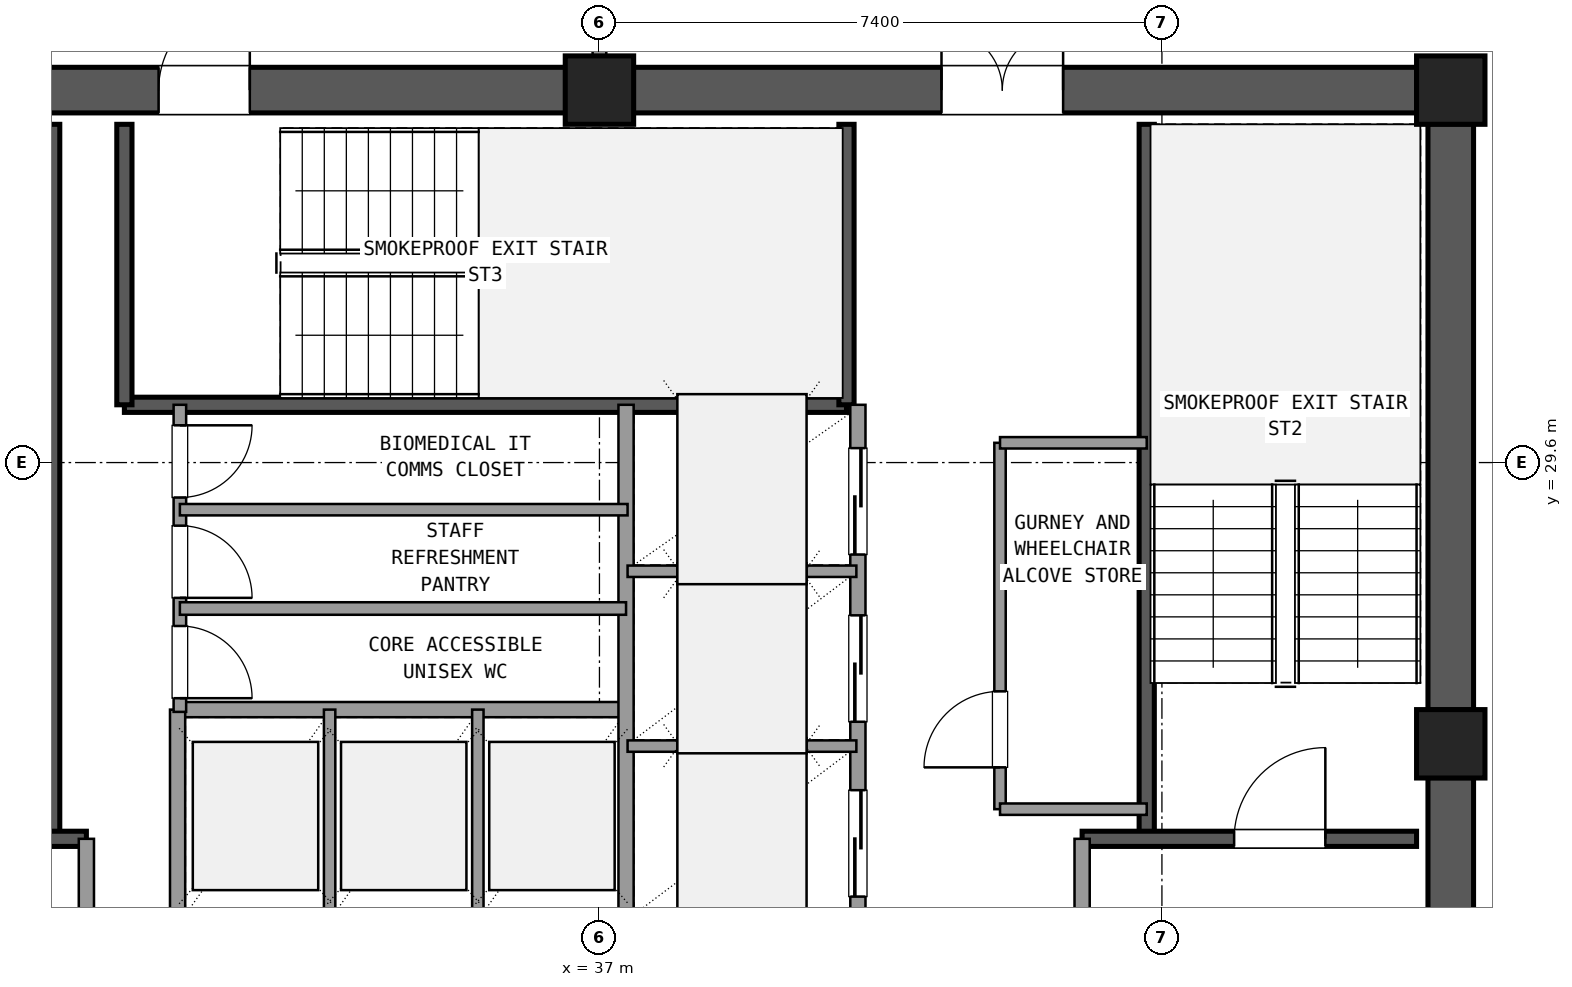
"""IFC4 building model, lengths in metres.
Left out: names, types, materials, properties, quantities, classifications, styles, units other than length and angle.
Written with IfcOpenShell. Run it as: python <this file> out.ifc"""

import sys

from ifc_helpers import new_model, si_unit, direction, frame, frame_2d, origin, origin_2d, place, context, subcontext, project, spatial, rectangle, extrude, element, fill, save


model = new_model("IFC4")
c1 = context("Model", 3, precision=1e-05, world=origin(), true_north=direction((0.0, 1.0)))
c2 = subcontext(c1, "Body", "Model", "MODEL_VIEW")
j1 = project(units=[si_unit("LENGTHUNIT", "METRE"), si_unit("PLANEANGLEUNIT", "RADIAN")], contexts=[c1])
p1 = place(None, origin())
s1 = spatial("IfcSite", under=j1, at=p1, CompositionType="ELEMENT")
p2 = place(p1, origin())
s2 = spatial("IfcBuilding", under=s1, at=p2, CompositionType="ELEMENT")
p3 = place(p2, frame((0.0, 0.0, 207.18)))
s3 = spatial("IfcBuildingStorey", under=s2, at=p3, CompositionType="ELEMENT", Elevation=207.18)
for number, where, z_axis, x_axis in (
    (1, (48.2, 25.9, 0.0), (0.0, 0.0, 1.0), (1.0, 0.0, 0.0)),
    (2, (48.2, 34.5, 0.0), (0.0, 0.0, 1.0), (1.0, 0.0, 0.0)),
    (3, (37.0, 34.5, 0.0), (0.0, 0.0, 1.0), (1.0, 0.0, 0.0)),
):
    element("IfcColumn", number, at=place(p3, frame(where, z_axis=z_axis, x_axis=x_axis)), inside=s3, PredefinedType="COLUMN", context=c2, shape_type="SweptSolid", body=[
        extrude(rectangle(XDim=0.9, YDim=0.9, at=origin_2d()), origin(), (0.0, 0.0, 1.0), 3.6),
    ])
p4 = place(p3, frame((48.2, 17.745, 0.0), z_axis=(0.0, 0.0, 1.0), x_axis=(0.0, 1.0, 0.0)))
e4 = element("IfcWall", 4, at=p4, inside=s3, PredefinedType="SHEAR", context=c2, shape_type="SweptSolid", body=[
    extrude(rectangle(XDim=7.71, YDim=0.6, at=frame_2d((3.855, 0.0))), origin(), (0.0, 0.0, 1.0), 3.32),
])
p5 = place(p4, frame((4.305, 0.0, 0.0)))
e5 = element("IfcOpeningElement", 5, at=p5, cuts=e4, PredefinedType="OPENING", context=c2, shape_type="SweptSolid", body=[
    extrude(rectangle(XDim=1.2, YDim=2.15, at=frame_2d((0.6, 1.075))), frame((0.0, 0.31, 0.0), z_axis=(0.0, -1.0, 0.0), x_axis=(1.0, 0.0, 0.0)), (0.0, 0.0, 1.0), 0.62),
])
p6 = place(p3, frame((48.2, 26.345, 0.0), z_axis=(0.0, 0.0, 1.0), x_axis=(0.0, 1.0, 0.0)))
e6 = element("IfcWall", 6, at=p6, inside=s3, PredefinedType="SHEAR", context=c2, shape_type="SweptSolid", body=[
    extrude(rectangle(XDim=7.71, YDim=0.6, at=frame_2d((3.855, 0.0))), origin(), (0.0, 0.0, 1.0), 3.32),
])
p7 = place(p3, frame((47.755, 34.5, 0.0), z_axis=(0.0, 0.0, 1.0), x_axis=(-1.0, 0.0, 0.0)))
e7 = element("IfcWall", 7, at=p7, inside=s3, PredefinedType="SHEAR", context=c2, shape_type="SweptSolid", body=[
    extrude(rectangle(XDim=10.31, YDim=0.6, at=frame_2d((5.155, 0.0))), origin(), (0.0, 0.0, 1.0), 3.32),
])
p8 = place(p7, frame((4.655, 0.0, 0.0)))
e8 = element("IfcOpeningElement", 8, at=p8, cuts=e7, PredefinedType="OPENING", context=c2, shape_type="SweptSolid", body=[
    extrude(rectangle(XDim=1.6, YDim=2.2, at=frame_2d((0.8, 1.1))), frame((0.0, 0.31, 0.0), z_axis=(0.0, -1.0, 0.0), x_axis=(1.0, 0.0, 0.0)), (0.0, 0.0, 1.0), 0.62),
])
p9 = place(p3, frame((36.555, 34.5, 0.0), z_axis=(0.0, 0.0, 1.0), x_axis=(-1.0, 0.0, 0.0)))
e9 = element("IfcWall", 9, at=p9, inside=s3, PredefinedType="SHEAR", context=c2, shape_type="SweptSolid", body=[
    extrude(rectangle(XDim=10.31, YDim=0.6, at=frame_2d((5.155, 0.0))), origin(), (0.0, 0.0, 1.0), 3.32),
])
p10 = place(p9, frame((4.155, 0.0, 0.0)))
e10 = element("IfcOpeningElement", 10, at=p10, cuts=e9, PredefinedType="OPENING", context=c2, shape_type="SweptSolid", body=[
    extrude(rectangle(XDim=1.2, YDim=2.15, at=frame_2d((0.6, 1.075))), frame((0.0, 0.31, 0.0), z_axis=(0.0, -1.0, 0.0), x_axis=(1.0, 0.0, 0.0)), (0.0, 0.0, 1.0), 0.62),
])
p11 = place(p3, frame((29.8, 24.65, 0.0), z_axis=(0.0, 0.0, 1.0), x_axis=(0.0, 1.0, 0.0)))
e11 = element("IfcWall", 11, at=p11, inside=s3, PredefinedType="SHEAR", context=c2, shape_type="SweptSolid", body=[
    extrude(rectangle(XDim=9.4, YDim=0.2, at=frame_2d((4.7, 0.0))), origin(), (0.0, 0.0, 1.0), 3.32),
])
p12 = place(p3, frame((26.25, 24.65, 0.0), z_axis=(0.0, 0.0, 1.0), x_axis=(1.0, 0.0, 0.0)))
e12 = element("IfcWall", 12, at=p12, inside=s3, PredefinedType="SHEAR", context=c2, shape_type="SweptSolid", body=[
    extrude(rectangle(XDim=4.0, YDim=0.2, at=frame_2d((2.0, 0.0))), origin(), (0.0, 0.0, 1.0), 3.32),
])
p13 = place(p12, frame((1.0, 0.0, 0.0)))
e13 = element("IfcOpeningElement", 13, at=p13, cuts=e12, PredefinedType="OPENING", context=c2, shape_type="SweptSolid", body=[
    extrude(rectangle(XDim=1.2, YDim=2.15, at=frame_2d((0.6, 1.075))), frame((0.0, 0.11, 0.0), z_axis=(0.0, -1.0, 0.0), x_axis=(1.0, 0.0, 0.0)), (0.0, 0.0, 1.0), 0.22),
])
p14 = place(p3, frame((44.2, 24.65, 0.0), z_axis=(0.0, 0.0, 1.0), x_axis=(0.0, 1.0, 0.0)))
e14 = element("IfcWall", 14, at=p14, inside=s3, PredefinedType="SHEAR", context=c2, shape_type="SweptSolid", body=[
    extrude(rectangle(XDim=9.4, YDim=0.2, at=frame_2d((4.7, 0.0))), origin(), (0.0, 0.0, 1.0), 3.32),
])
p15 = place(p3, frame((43.35, 24.65, 0.0), z_axis=(0.0, 0.0, 1.0), x_axis=(1.0, 0.0, 0.0)))
e15 = element("IfcWall", 15, at=p15, inside=s3, PredefinedType="SHEAR", context=c2, shape_type="SweptSolid", body=[
    extrude(rectangle(XDim=4.4, YDim=0.2, at=frame_2d((2.2, 0.0))), origin(), (0.0, 0.0, 1.0), 3.32),
])
p16 = place(p15, frame((2.0, 0.0, 0.0)))
e16 = element("IfcOpeningElement", 16, at=p16, cuts=e15, PredefinedType="OPENING", context=c2, shape_type="SweptSolid", body=[
    extrude(rectangle(XDim=1.2, YDim=2.15, at=frame_2d((0.6, 1.075))), frame((0.0, 0.11, 0.0), z_axis=(0.0, -1.0, 0.0), x_axis=(1.0, 0.0, 0.0)), (0.0, 0.0, 1.0), 0.22),
])
p17 = place(p3, frame((30.75, 30.36, 0.0), z_axis=(0.0, 0.0, 1.0), x_axis=(1.0, 0.0, 0.0)))
e17 = element("IfcWall", 17, at=p17, inside=s3, PredefinedType="SHEAR", context=c2, shape_type="SweptSolid", body=[
    extrude(rectangle(XDim=9.5, YDim=0.2, at=frame_2d((4.75, 0.0))), origin(), (0.0, 0.0, 1.0), 3.32),
])
for number, where, z_axis, x_axis in (
    (18, (30.75, 30.36, 0.0), (0.0, 0.0, 1.0), (0.0, 1.0, 0.0)),
    (19, (40.25, 30.36, 0.0), (0.0, 0.0, 1.0), (0.0, 1.0, 0.0)),
):
    element("IfcWall", number, at=place(p3, frame(where, z_axis=z_axis, x_axis=x_axis)), inside=s3, PredefinedType="SHEAR", context=c2, shape_type="SweptSolid", body=[
        extrude(rectangle(XDim=3.69, YDim=0.2, at=frame_2d((1.845, 0.0))), origin(), (0.0, 0.0, 1.0), 3.32),
    ])
p18 = place(p3, frame((30.25, 17.75, 0.0), z_axis=(0.0, 0.0, 1.0), x_axis=(0.0, 1.0, 0.0)))
e20 = element("IfcWall", 20, at=p18, inside=s3, PredefinedType="SOLIDWALL", context=c2, shape_type="SweptSolid", body=[
    extrude(rectangle(XDim=6.9, YDim=0.2, at=frame_2d((3.45, 0.0))), origin(), (0.0, 0.0, 1.0), 2.61),
])
p19 = place(p18, frame((4.15, 0.0, 0.0)))
e21 = element("IfcOpeningElement", 21, at=p19, cuts=e20, PredefinedType="OPENING", context=c2, shape_type="SweptSolid", body=[
    extrude(rectangle(XDim=1.2, YDim=2.15, at=frame_2d((0.6, 1.075))), frame((0.0, 0.11, 0.0), z_axis=(0.0, -1.0, 0.0), x_axis=(1.0, 0.0, 0.0)), (0.0, 0.0, 1.0), 0.22),
])
p20 = place(p3, frame((43.35, 17.75, 0.0), z_axis=(0.0, 0.0, 1.0), x_axis=(0.0, 1.0, 0.0)))
e22 = element("IfcWall", 22, at=p20, inside=s3, PredefinedType="SOLIDWALL", context=c2, shape_type="SweptSolid", body=[
    extrude(rectangle(XDim=6.9, YDim=0.2, at=frame_2d((3.45, 0.0))), origin(), (0.0, 0.0, 1.0), 2.61),
])
p21 = place(p20, frame((4.15, 0.0, 0.0)))
e23 = element("IfcOpeningElement", 23, at=p21, cuts=e22, PredefinedType="OPENING", context=c2, shape_type="SweptSolid", body=[
    extrude(rectangle(XDim=1.2, YDim=2.15, at=frame_2d((0.6, 1.075))), frame((0.0, 0.11, 0.0), z_axis=(0.0, -1.0, 0.0), x_axis=(1.0, 0.0, 0.0)), (0.0, 0.0, 1.0), 0.22),
])
p22 = place(p3, frame((31.45, 26.35, 0.0), z_axis=(0.0, 0.0, 1.0), x_axis=(1.0, 0.0, 0.0)))
e24 = element("IfcWall", 24, at=p22, inside=s3, PredefinedType="SOLIDWALL", context=c2, shape_type="SweptSolid", body=[
    extrude(rectangle(XDim=5.9, YDim=0.2, at=frame_2d((2.95, 0.0))), origin(), (0.0, 0.0, 1.0), 2.61),
])
p23 = place(p3, frame((31.45, 23.54, 0.0), z_axis=(0.0, 0.0, 1.0), x_axis=(0.0, 1.0, 0.0)))
e25 = element("IfcWall", 25, at=p23, inside=s3, PredefinedType="SOLIDWALL", context=c2, shape_type="SweptSolid", body=[
    extrude(rectangle(XDim=2.81, YDim=0.2, at=frame_2d((1.405, 0.0))), origin(), (0.0, 0.0, 1.0), 2.61),
])
for number, where, z_axis, x_axis in (
    (26, (33.45, 23.54, 0.0), (0.0, 0.0, 1.0), (0.0, 1.0, 0.0)),
    (27, (35.4, 23.54, 0.0), (0.0, 0.0, 1.0), (0.0, 1.0, 0.0)),
):
    element("IfcWall", number, at=place(p3, frame(where, z_axis=z_axis, x_axis=x_axis)), inside=s3, PredefinedType="PARTITIONING", context=c2, shape_type="SweptSolid", body=[
        extrude(rectangle(XDim=2.81, YDim=0.15, at=frame_2d((1.405, 0.0))), origin(), (0.0, 0.0, 1.0), 2.61),
    ])
p24 = place(p3, frame((37.35, 23.54, 0.0), z_axis=(0.0, 0.0, 1.0), x_axis=(0.0, 1.0, 0.0)))
e28 = element("IfcWall", 28, at=p24, inside=s3, PredefinedType="SOLIDWALL", context=c2, shape_type="SweptSolid", body=[
    extrude(rectangle(XDim=6.82, YDim=0.2, at=frame_2d((3.41, 0.0))), origin(), (0.0, 0.0, 1.0), 2.61),
])
p25 = place(p3, frame((40.4, 23.54, 0.0), z_axis=(0.0, 0.0, 1.0), x_axis=(0.0, 1.0, 0.0)))
e29 = element("IfcWall", 29, at=p25, inside=s3, PredefinedType="SOLIDWALL", context=c2, shape_type="SweptSolid", body=[
    extrude(rectangle(XDim=6.82, YDim=0.2, at=frame_2d((3.41, 0.0))), origin(), (0.0, 0.0, 1.0), 2.61),
])
p26 = place(p25, frame((0.35, 0.0, 0.0)))
e30 = element("IfcOpeningElement", 30, at=p26, cuts=e29, PredefinedType="OPENING", context=c2, shape_type="SweptSolid", body=[
    extrude(rectangle(XDim=1.4, YDim=2.2, at=frame_2d((0.7, 1.1))), frame((0.0, 0.11, 0.0), z_axis=(0.0, -1.0, 0.0), x_axis=(1.0, 0.0, 0.0)), (0.0, 0.0, 1.0), 0.22),
])
p27 = place(p25, frame((2.65, 0.0, 0.0)))
e31 = element("IfcOpeningElement", 31, at=p27, cuts=e29, PredefinedType="OPENING", context=c2, shape_type="SweptSolid", body=[
    extrude(rectangle(XDim=1.4, YDim=2.2, at=frame_2d((0.7, 1.1))), frame((0.0, 0.11, 0.0), z_axis=(0.0, -1.0, 0.0), x_axis=(1.0, 0.0, 0.0)), (0.0, 0.0, 1.0), 0.22),
])
p28 = place(p25, frame((4.85, 0.0, 0.0)))
e32 = element("IfcOpeningElement", 32, at=p28, cuts=e29, PredefinedType="OPENING", context=c2, shape_type="SweptSolid", body=[
    extrude(rectangle(XDim=1.4, YDim=2.2, at=frame_2d((0.7, 1.1))), frame((0.0, 0.11, 0.0), z_axis=(0.0, -1.0, 0.0), x_axis=(1.0, 0.0, 0.0)), (0.0, 0.0, 1.0), 0.22),
])
for number, where, z_axis, x_axis in (
    (33, (37.37, 25.87, 0.0), (0.0, 0.0, 1.0), (1.0, 0.0, 0.0)),
    (34, (37.37, 28.17, 0.0), (0.0, 0.0, 1.0), (1.0, 0.0, 0.0)),
):
    element("IfcWall", number, at=place(p3, frame(where, z_axis=z_axis, x_axis=x_axis)), inside=s3, PredefinedType="PARTITIONING", context=c2, shape_type="SweptSolid", body=[
        extrude(rectangle(XDim=3.01, YDim=0.15, at=frame_2d((1.505, 0.0))), origin(), (0.0, 0.0, 1.0), 2.61),
    ])
p29 = place(p3, frame((42.27, 25.04, 0.0), z_axis=(0.0, 0.0, 1.0), x_axis=(0.0, 1.0, 0.0)))
e35 = element("IfcWall", 35, at=p29, inside=s3, PredefinedType="PARTITIONING", context=c2, shape_type="SweptSolid", body=[
    extrude(rectangle(XDim=4.82, YDim=0.15, at=frame_2d((2.41, 0.0))), origin(), (0.0, 0.0, 1.0), 2.61),
])
p30 = place(p29, frame((0.55, 0.0, 0.0)))
e36 = element("IfcOpeningElement", 36, at=p30, cuts=e35, PredefinedType="OPENING", context=c2, shape_type="SweptSolid", body=[
    extrude(rectangle(XDim=1.0, YDim=2.15, at=frame_2d((0.5, 1.075))), frame((0.0, 0.085, 0.0), z_axis=(0.0, -1.0, 0.0), x_axis=(1.0, 0.0, 0.0)), (0.0, 0.0, 1.0), 0.17),
])
for number, where, z_axis, x_axis in (
    (37, (42.27, 25.04, 0.0), (0.0, 0.0, 1.0), (1.0, 0.0, 0.0)),
    (38, (42.27, 29.86, 0.0), (0.0, 0.0, 1.0), (1.0, 0.0, 0.0)),
):
    element("IfcWall", number, at=place(p3, frame(where, z_axis=z_axis, x_axis=x_axis)), inside=s3, PredefinedType="PARTITIONING", context=c2, shape_type="SweptSolid", body=[
        extrude(rectangle(XDim=1.93, YDim=0.15, at=frame_2d((0.965, 0.0))), origin(), (0.0, 0.0, 1.0), 2.61),
    ])
p31 = place(p3, frame((31.48, 26.32, 0.0), z_axis=(0.0, 0.0, 1.0), x_axis=(0.0, 1.0, 0.0)))
e39 = element("IfcWall", 39, at=p31, inside=s3, PredefinedType="PLUMBINGWALL", context=c2, shape_type="SweptSolid", body=[
    extrude(rectangle(XDim=4.04, YDim=0.165, at=frame_2d((2.02, 0.0))), origin(), (0.0, 0.0, 1.0), 2.61),
])
p32 = place(p31, frame((0.18, 0.0, 0.0)))
e40 = element("IfcOpeningElement", 40, at=p32, cuts=e39, PredefinedType="OPENING", context=c2, shape_type="SweptSolid", body=[
    extrude(rectangle(XDim=0.95, YDim=2.1, at=frame_2d((0.475, 1.05))), frame((0.0, 0.093, 0.0), z_axis=(0.0, -1.0, 0.0), x_axis=(1.0, 0.0, 0.0)), (0.0, 0.0, 1.0), 0.185),
])
p33 = place(p31, frame((1.5, 0.0, 0.0)))
e41 = element("IfcOpeningElement", 41, at=p33, cuts=e39, PredefinedType="OPENING", context=c2, shape_type="SweptSolid", body=[
    extrude(rectangle(XDim=0.95, YDim=2.1, at=frame_2d((0.475, 1.05))), frame((0.0, 0.093, 0.0), z_axis=(0.0, -1.0, 0.0), x_axis=(1.0, 0.0, 0.0)), (0.0, 0.0, 1.0), 0.185),
])
p34 = place(p31, frame((2.82, 0.0, 0.0)))
e42 = element("IfcOpeningElement", 42, at=p34, cuts=e39, PredefinedType="OPENING", context=c2, shape_type="SweptSolid", body=[
    extrude(rectangle(XDim=0.95, YDim=2.1, at=frame_2d((0.475, 1.05))), frame((0.0, 0.093, 0.0), z_axis=(0.0, -1.0, 0.0), x_axis=(1.0, 0.0, 0.0)), (0.0, 0.0, 1.0), 0.185),
])
p35 = place(p3, frame((31.48, 27.68, 0.0), z_axis=(0.0, 0.0, 1.0), x_axis=(1.0, 0.0, 0.0)))
e43 = element("IfcWall", 43, at=p35, inside=s3, PredefinedType="PLUMBINGWALL", context=c2, shape_type="SweptSolid", body=[
    extrude(rectangle(XDim=5.87, YDim=0.165, at=frame_2d((2.935, 0.0))), origin(), (0.0, 0.0, 1.0), 2.61),
])
p36 = place(p3, frame((31.48, 28.98, 0.0), z_axis=(0.0, 0.0, 1.0), x_axis=(1.0, 0.0, 0.0)))
e44 = element("IfcWall", 44, at=p36, inside=s3, PredefinedType="PARTITIONING", context=c2, shape_type="SweptSolid", body=[
    extrude(rectangle(XDim=5.89, YDim=0.15, at=frame_2d((2.945, 0.0))), origin(), (0.0, 0.0, 1.0), 2.61),
])
p37 = place(p3, frame((37.0, 34.95, 0.0), z_axis=(0.0, 0.0, 1.0), x_axis=(0.0, 1.0, 0.0)))
e45 = element("IfcWall", 45, at=p37, inside=s3, PredefinedType="PARTITIONING", context=c2, shape_type="SweptSolid", body=[
    extrude(rectangle(XDim=2.7, YDim=0.18, at=frame_2d((1.35, 0.0))), origin(), (0.0, 0.0, 1.0), 2.61),
])
p38 = place(p37, frame((0.35, 0.0, 0.0)))
e46 = element("IfcOpeningElement", 46, at=p38, cuts=e45, PredefinedType="OPENING", context=c2, shape_type="SweptSolid", body=[
    extrude(rectangle(XDim=2.0, YDim=2.2, at=frame_2d((1.0, 1.1))), frame((0.0, 0.1, 0.0), z_axis=(0.0, -1.0, 0.0), x_axis=(1.0, 0.0, 0.0)), (0.0, 0.0, 1.0), 0.2),
])
p39 = place(p16, origin())
e47 = element("IfcDoor", 47, at=p39, inside=s3, OperationType="SINGLE_SWING_RIGHT", PredefinedType="DOOR", context=c2, shape_type="SweptSolid", body=[
    extrude(rectangle(XDim=1.2, YDim=2.15, at=frame_2d((0.6, 1.075))), frame((0.0, 0.025, 0.0), z_axis=(0.0, -1.0, 0.0), x_axis=(1.0, 0.0, 0.0)), (0.0, 0.0, 1.0), 0.05),
])
fill(e16, e47)
p40 = place(p8, frame((1.6, 0.0, 0.0), z_axis=(0.0, 0.0, 1.0), x_axis=(-1.0, 0.0, 0.0)))
e48 = element("IfcDoor", 48, at=p40, inside=s3, OperationType="DOUBLE_DOOR_SINGLE_SWING", PredefinedType="DOOR", context=c2, shape_type="SweptSolid", body=[
    extrude(rectangle(XDim=1.6, YDim=2.2, at=frame_2d((0.8, 1.1))), frame((0.0, 0.025, 0.0), z_axis=(0.0, -1.0, 0.0), x_axis=(1.0, 0.0, 0.0)), (0.0, 0.0, 1.0), 0.05),
])
fill(e8, e48)
p41 = place(p10, frame((1.2, 0.0, 0.0), z_axis=(0.0, 0.0, 1.0), x_axis=(-1.0, 0.0, 0.0)))
e49 = element("IfcDoor", 49, at=p41, inside=s3, OperationType="SINGLE_SWING_LEFT", PredefinedType="DOOR", context=c2, shape_type="SweptSolid", body=[
    extrude(rectangle(XDim=1.2, YDim=2.15, at=frame_2d((0.6, 1.075))), frame((0.0, 0.025, 0.0), z_axis=(0.0, -1.0, 0.0), x_axis=(1.0, 0.0, 0.0)), (0.0, 0.0, 1.0), 0.05),
])
fill(e10, e49)
p42 = place(p26, origin())
e50 = element("IfcDoor", 50, at=p42, inside=s3, OperationType="SLIDING_TO_LEFT", PredefinedType="DOOR", context=c2, shape_type="SweptSolid", body=[
    extrude(rectangle(XDim=1.4, YDim=2.2, at=frame_2d((0.7, 1.1))), frame((0.0, 0.025, 0.0), z_axis=(0.0, -1.0, 0.0), x_axis=(1.0, 0.0, 0.0)), (0.0, 0.0, 1.0), 0.05),
])
fill(e30, e50)
p43 = place(p27, origin())
e51 = element("IfcDoor", 51, at=p43, inside=s3, OperationType="SLIDING_TO_LEFT", PredefinedType="DOOR", context=c2, shape_type="SweptSolid", body=[
    extrude(rectangle(XDim=1.4, YDim=2.2, at=frame_2d((0.7, 1.1))), frame((0.0, 0.025, 0.0), z_axis=(0.0, -1.0, 0.0), x_axis=(1.0, 0.0, 0.0)), (0.0, 0.0, 1.0), 0.05),
])
fill(e31, e51)
p44 = place(p28, origin())
e52 = element("IfcDoor", 52, at=p44, inside=s3, OperationType="SLIDING_TO_RIGHT", PredefinedType="DOOR", context=c2, shape_type="SweptSolid", body=[
    extrude(rectangle(XDim=1.4, YDim=2.2, at=frame_2d((0.7, 1.1))), frame((0.0, 0.025, 0.0), z_axis=(0.0, -1.0, 0.0), x_axis=(1.0, 0.0, 0.0)), (0.0, 0.0, 1.0), 0.05),
])
fill(e32, e52)
p45 = place(p30, origin())
e53 = element("IfcDoor", 53, at=p45, inside=s3, OperationType="SINGLE_SWING_LEFT", PredefinedType="DOOR", context=c2, shape_type="SweptSolid", body=[
    extrude(rectangle(XDim=1.0, YDim=2.15, at=frame_2d((0.5, 1.075))), frame((0.0, 0.025, 0.0), z_axis=(0.0, -1.0, 0.0), x_axis=(1.0, 0.0, 0.0)), (0.0, 0.0, 1.0), 0.05),
])
fill(e36, e53)
p46 = place(p32, frame((0.95, 0.0, 0.0), z_axis=(0.0, 0.0, 1.0), x_axis=(-1.0, 0.0, 0.0)))
e54 = element("IfcDoor", 54, at=p46, inside=s3, OperationType="SINGLE_SWING_LEFT", PredefinedType="DOOR", context=c2, shape_type="SweptSolid", body=[
    extrude(rectangle(XDim=0.95, YDim=2.1, at=frame_2d((0.475, 1.05))), frame((0.0, 0.025, 0.0), z_axis=(0.0, -1.0, 0.0), x_axis=(1.0, 0.0, 0.0)), (0.0, 0.0, 1.0), 0.05),
])
fill(e40, e54)
p47 = place(p33, frame((0.95, 0.0, 0.0), z_axis=(0.0, 0.0, 1.0), x_axis=(-1.0, 0.0, 0.0)))
e55 = element("IfcDoor", 55, at=p47, inside=s3, OperationType="SINGLE_SWING_LEFT", PredefinedType="DOOR", context=c2, shape_type="SweptSolid", body=[
    extrude(rectangle(XDim=0.95, YDim=2.1, at=frame_2d((0.475, 1.05))), frame((0.0, 0.025, 0.0), z_axis=(0.0, -1.0, 0.0), x_axis=(1.0, 0.0, 0.0)), (0.0, 0.0, 1.0), 0.05),
])
fill(e41, e55)
p48 = place(p34, frame((0.95, 0.0, 0.0), z_axis=(0.0, 0.0, 1.0), x_axis=(-1.0, 0.0, 0.0)))
e56 = element("IfcDoor", 56, at=p48, inside=s3, OperationType="SINGLE_SWING_RIGHT", PredefinedType="DOOR", context=c2, shape_type="SweptSolid", body=[
    extrude(rectangle(XDim=0.95, YDim=2.1, at=frame_2d((0.475, 1.05))), frame((0.0, 0.025, 0.0), z_axis=(0.0, -1.0, 0.0), x_axis=(1.0, 0.0, 0.0)), (0.0, 0.0, 1.0), 0.05),
])
fill(e42, e56)
save(model, sys.argv[1])
